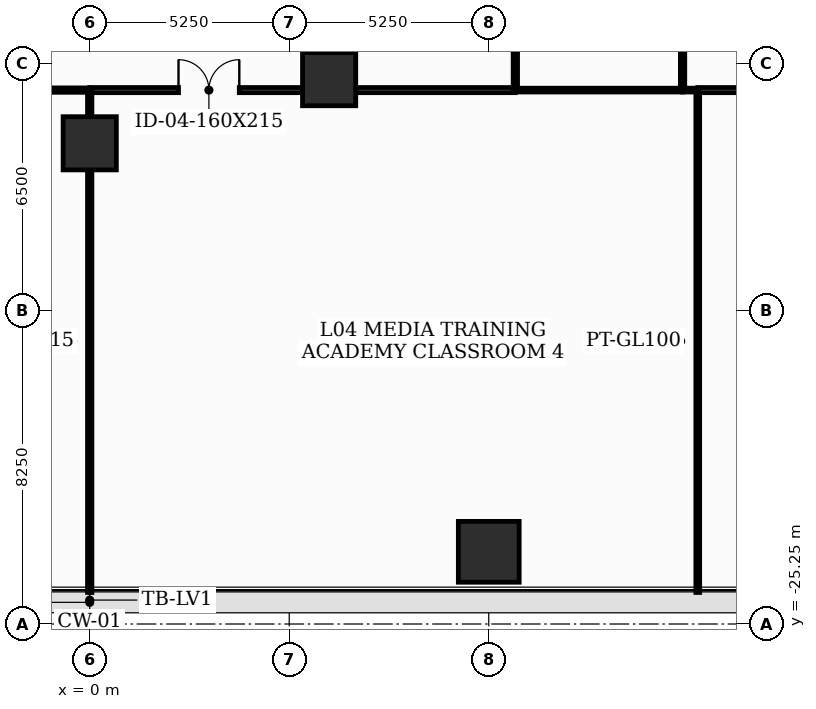
"""IFC4 building model, lengths in metres.
Left out: names, types, materials, properties, quantities, classifications, styles, units other than length and angle.
Written with IfcOpenShell. Run it as: python <this file> out.ifc"""

import sys

from ifc_helpers import new_model, si_unit, direction, frame, frame_2d, origin, origin_2d, place, context, subcontext, project, spatial, rectangle, extrude, element, fill, save


model = new_model("IFC4")
c1 = context("Model", 3, precision=1e-05, world=origin(), true_north=direction((0.0, 1.0)))
c2 = subcontext(c1, "Body", "Model", "MODEL_VIEW")
j1 = project(units=[si_unit("LENGTHUNIT", "METRE"), si_unit("PLANEANGLEUNIT", "RADIAN")], contexts=[c1])
p1 = place(None, origin())
s1 = spatial("IfcSite", under=j1, at=p1, CompositionType="ELEMENT")
p2 = place(p1, origin())
s2 = spatial("IfcBuilding", under=s1, at=p2, CompositionType="ELEMENT")
p3 = place(p2, frame((0.0, 0.0, 20.8)))
s3 = spatial("IfcBuildingStorey", under=s2, at=p3, CompositionType="ELEMENT", Elevation=20.8)
for number, where, z_axis, x_axis in (
    (1, (0.0, -12.6, 0.0), (0.0, 0.0, 1.0), (1.0, 0.0, 0.0)),
    (2, (6.3, -10.912, 0.0), (0.0, 0.0, 1.0), (1.0, 0.0, 0.0)),
):
    element("IfcColumn", number, at=place(p3, frame(where, z_axis=z_axis, x_axis=x_axis)), inside=s3, PredefinedType="COLUMN", context=c2, shape_type="SweptSolid", body=[
        extrude(rectangle(XDim=1.4, YDim=1.4, at=origin_2d()), origin(), (0.0, 0.0, 1.0), 5.2),
    ])
p4 = place(p3, frame((10.5, -23.35, 0.0), z_axis=(0.0, 0.0, 1.0), x_axis=(1.0, 0.0, 0.0)))
e3 = element("IfcColumn", 3, at=p4, inside=s3, PredefinedType="COLUMN", context=c2, shape_type="SweptSolid", body=[
    extrude(rectangle(XDim=1.6, YDim=1.6, at=origin_2d()), origin(), (0.0, 0.0, 1.0), 5.2),
])
p5 = place(p3, frame((-11.2, -11.2, 0.0), z_axis=(0.0, 0.0, 1.0), x_axis=(1.0, 0.0, 0.0)))
e4 = element("IfcWall", 4, at=p5, inside=s3, PredefinedType="PARTITIONING", context=c2, shape_type="SweptSolid", body=[
    extrude(rectangle(XDim=11.2, YDim=0.115, at=frame_2d((5.6, 0.0))), origin(), (0.0, 0.0, 1.0), 3.525),
])
p6 = place(p5, frame((7.589, 0.0, 0.0)))
e5 = element("IfcOpeningElement", 5, at=p6, cuts=e4, PredefinedType="OPENING", context=c2, shape_type="SweptSolid", body=[
    extrude(rectangle(XDim=0.95, YDim=2.1, at=frame_2d((0.475, 1.05))), frame((0.0, 0.067, 0.0), z_axis=(0.0, -1.0, 0.0), x_axis=(1.0, 0.0, 0.0)), (0.0, 0.0, 1.0), 0.135),
])
p7 = place(p3, frame((0.0, -11.2, 0.0), z_axis=(0.0, 0.0, 1.0), x_axis=(1.0, 0.0, 0.0)))
e6 = element("IfcWall", 6, at=p7, inside=s3, PredefinedType="PARTITIONING", context=c2, shape_type="SweptSolid", body=[
    extrude(rectangle(XDim=11.2, YDim=0.135, at=frame_2d((5.6, 0.0))), origin(), (0.0, 0.0, 1.0), 3.525),
])
p8 = place(p7, frame((2.336, 0.0, 0.0)))
e7 = element("IfcOpeningElement", 7, at=p8, cuts=e6, PredefinedType="OPENING", context=c2, shape_type="SweptSolid", body=[
    extrude(rectangle(XDim=1.6, YDim=2.15, at=frame_2d((0.8, 1.075))), frame((0.0, 0.077, 0.0), z_axis=(0.0, -1.0, 0.0), x_axis=(1.0, 0.0, 0.0)), (0.0, 0.0, 1.0), 0.155),
])
p9 = place(p3, frame((11.2, -11.2, 0.0), z_axis=(0.0, 0.0, 1.0), x_axis=(0.0, 1.0, 0.0)))
e8 = element("IfcWall", 8, at=p9, inside=s3, PredefinedType="PARTITIONING", context=c2, shape_type="SweptSolid", body=[
    extrude(rectangle(XDim=3.8, YDim=0.115, at=frame_2d((1.9, 0.0))), origin(), (0.0, 0.0, 1.0), 4.94),
])
p10 = place(p9, frame((1.44, 0.0, 0.0)))
e9 = element("IfcOpeningElement", 9, at=p10, cuts=e8, PredefinedType="OPENING", context=c2, shape_type="SweptSolid", body=[
    extrude(rectangle(XDim=0.92, YDim=2.1, at=frame_2d((0.46, 1.05))), frame((0.0, 0.067, 0.0), z_axis=(0.0, -1.0, 0.0), x_axis=(1.0, 0.0, 0.0)), (0.0, 0.0, 1.0), 0.135),
])
p11 = place(p3, frame((0.0, -24.42, 0.0), z_axis=(0.0, 0.0, 1.0), x_axis=(0.0, 1.0, 0.0)))
e10 = element("IfcWall", 10, at=p11, inside=s3, PredefinedType="PARTITIONING", context=c2, shape_type="SweptSolid", body=[
    extrude(rectangle(XDim=13.22, YDim=0.115, at=frame_2d((6.61, 0.0))), origin(), (0.0, 0.0, 1.0), 3.425),
])
p12 = place(p3, frame((15.6, -11.2, 0.0), z_axis=(0.0, 0.0, 1.0), x_axis=(-1.0, 0.0, 0.0)))
e11 = element("IfcWall", 11, at=p12, inside=s3, PredefinedType="MOVABLE", context=c2, shape_type="SweptSolid", body=[
    extrude(rectangle(XDim=4.4, YDim=0.1, at=frame_2d((2.2, 0.0))), origin(), (0.0, 0.0, 1.0), 4.94),
])
p13 = place(p3, frame((16.0, -24.42, 0.0), z_axis=(0.0, 0.0, 1.0), x_axis=(0.0, 1.0, 0.0)))
e12 = element("IfcWall", 12, at=p13, inside=s3, PredefinedType="MOVABLE", context=c2, shape_type="SweptSolid", body=[
    extrude(rectangle(XDim=13.22, YDim=0.1, at=frame_2d((6.61, 0.0))), origin(), (0.0, 0.0, 1.0), 3.425),
])
p14 = place(p3, frame((16.0, -11.2, 0.0), z_axis=(0.0, 0.0, 1.0), x_axis=(-1.0, 0.0, 0.0)))
e13 = element("IfcWall", 13, at=p14, inside=s3, PredefinedType="MOVABLE", context=c2, shape_type="SweptSolid", body=[
    extrude(rectangle(XDim=0.4, YDim=0.1, at=frame_2d((0.2, 0.0))), origin(), (0.0, 0.0, 1.0), 4.94),
])
p15 = place(p3, frame((15.6, -11.2, 0.0), z_axis=(0.0, 0.0, 1.0), x_axis=(0.0, 1.0, 0.0)))
e14 = element("IfcWall", 14, at=p15, inside=s3, PredefinedType="PARTITIONING", context=c2, shape_type="SweptSolid", body=[
    extrude(rectangle(XDim=3.8, YDim=0.115, at=frame_2d((1.9, 0.0))), origin(), (0.0, 0.0, 1.0), 4.94),
])
p16 = place(p3, frame((36.92, -11.2, 0.0), z_axis=(0.0, 0.0, 1.0), x_axis=(-1.0, 0.0, 0.0)))
e15 = element("IfcWall", 15, at=p16, inside=s3, PredefinedType="PARTITIONING", context=c2, shape_type="SweptSolid", body=[
    extrude(rectangle(XDim=20.92, YDim=0.135, at=frame_2d((10.46, 0.0))), origin(), (0.0, 0.0, 1.0), 3.425),
])
p17 = place(p16, frame((10.0, 0.0, 0.0)))
e16 = element("IfcOpeningElement", 16, at=p17, cuts=e15, PredefinedType="OPENING", context=c2, shape_type="SweptSolid", body=[
    extrude(rectangle(XDim=0.92, YDim=2.1, at=frame_2d((0.46, 1.05))), frame((0.0, 0.077, 0.0), z_axis=(0.0, -1.0, 0.0), x_axis=(1.0, 0.0, 0.0)), (0.0, 0.0, 1.0), 0.155),
])
p18 = place(p8, origin())
e17 = element("IfcDoor", 17, at=p18, inside=s3, OperationType="DOUBLE_DOOR_SINGLE_SWING", PredefinedType="DOOR", context=c2, shape_type="SweptSolid", body=[
    extrude(rectangle(XDim=1.6, YDim=2.15, at=frame_2d((0.8, 1.075))), frame((0.0, 0.025, 0.0), z_axis=(0.0, -1.0, 0.0), x_axis=(1.0, 0.0, 0.0)), (0.0, 0.0, 1.0), 0.05),
])
fill(e7, e17)
save(model, sys.argv[1])
